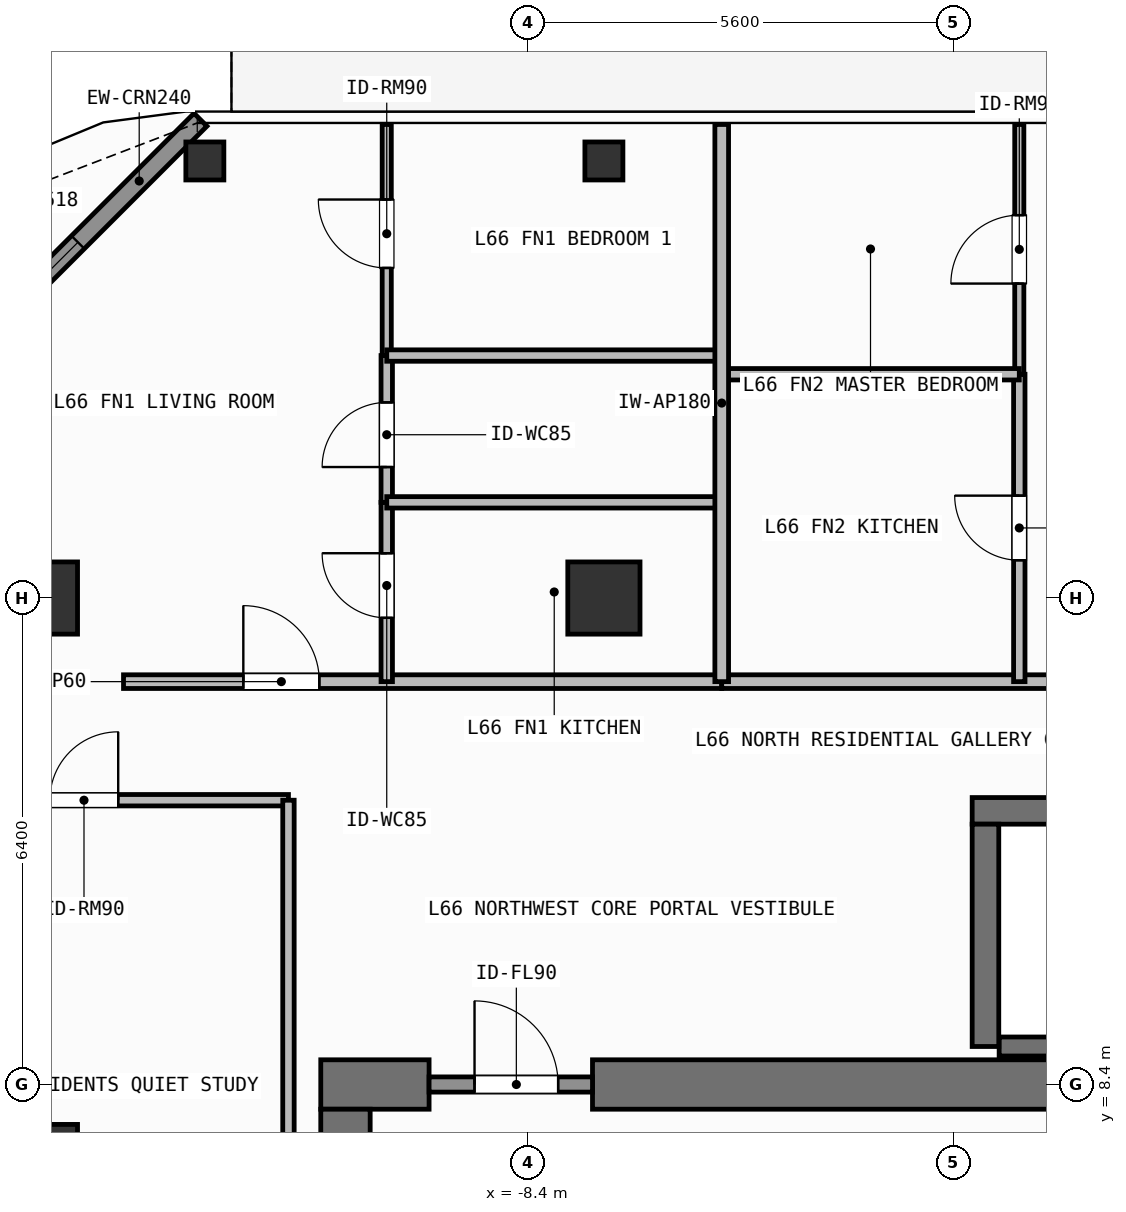
"""IFC4 building model, lengths in metres.
Left out: names, types, materials, properties, quantities, classifications, styles, units other than length and angle.
Written with IfcOpenShell. Run it as: python <this file> out.ifc"""

import sys

from ifc_helpers import new_model, si_unit, direction, frame, frame_2d, origin, origin_2d, place, context, subcontext, project, spatial, rectangle, hollow_rectangle, extrude, element, fill, save


model = new_model("IFC4")
c1 = context("Model", 3, precision=1e-05, world=origin(), true_north=direction((0.0, 1.0)))
c2 = subcontext(c1, "Body", "Model", "MODEL_VIEW")
j1 = project(units=[si_unit("LENGTHUNIT", "METRE"), si_unit("PLANEANGLEUNIT", "RADIAN")], contexts=[c1])
p1 = place(None, origin())
s1 = spatial("IfcSite", under=j1, at=p1, CompositionType="ELEMENT")
p2 = place(p1, origin())
s2 = spatial("IfcBuilding", under=s1, at=p2, CompositionType="ELEMENT")
p3 = place(p2, frame((0.0, 0.0, 270.3)))
s3 = spatial("IfcBuildingStorey", under=s2, at=p3, CompositionType="ELEMENT", Elevation=270.3)
p4 = place(p3, frame((-11.125, 8.4, 0.0), z_axis=(0.0, 0.0, 1.0), x_axis=(1.0, 0.0, 0.0)))
e1 = element("IfcWall", 1, at=p4, inside=s3, PredefinedType="SHEAR", context=c2, shape_type="SweptSolid", body=[
    extrude(rectangle(XDim=1.425, YDim=0.65, at=frame_2d((0.712, 0.0))), origin(), (0.0, 0.0, 1.0), 3.9),
])
p5 = place(p3, frame((-7.55, 8.4, 0.0), z_axis=(0.0, 0.0, 1.0), x_axis=(1.0, 0.0, 0.0)))
e2 = element("IfcWall", 2, at=p5, inside=s3, PredefinedType="SHEAR", context=c2, shape_type="SweptSolid", body=[
    extrude(rectangle(XDim=16.275, YDim=0.65, at=frame_2d((8.138, 0.0))), origin(), (0.0, 0.0, 1.0), 3.9),
])
p6 = place(p3, frame((-10.8, -8.075, 0.0), z_axis=(0.0, 0.0, 1.0), x_axis=(0.0, 1.0, 0.0)))
e3 = element("IfcWall", 3, at=p6, inside=s3, PredefinedType="SHEAR", context=c2, shape_type="SweptSolid", body=[
    extrude(rectangle(XDim=16.15, YDim=0.65, at=frame_2d((8.075, 0.0))), origin(), (0.0, 0.0, 1.0), 3.9),
])
p7 = place(p3, frame((-2.555, 12.0, 0.0), z_axis=(0.0, 0.0, 1.0), x_axis=(1.0, 0.0, 0.0)))
e4 = element("IfcWall", 4, at=p7, inside=s3, PredefinedType="SHEAR", context=c2, shape_type="SweptSolid", body=[
    extrude(rectangle(XDim=7.31, YDim=0.35, at=frame_2d((3.655, 0.0))), origin(), (0.0, 0.0, 1.0), 3.9),
])
p8 = place(p3, frame((-2.2, 8.9, 0.0), z_axis=(0.0, 0.0, 1.0), x_axis=(1.0, 0.0, 0.0)))
e5 = element("IfcWall", 5, at=p8, inside=s3, PredefinedType="SHEAR", context=c2, shape_type="SweptSolid", body=[
    extrude(rectangle(XDim=6.6, YDim=0.25, at=frame_2d((3.3, 0.0))), origin(), (0.0, 0.0, 1.0), 3.9),
])
p9 = place(p3, frame((-2.38, 8.9, 0.0), z_axis=(0.0, 0.0, 1.0), x_axis=(0.0, 1.0, 0.0)))
e6 = element("IfcWall", 6, at=p9, inside=s3, PredefinedType="SHEAR", context=c2, shape_type="SweptSolid", body=[
    extrude(rectangle(XDim=2.925, YDim=0.35, at=frame_2d((1.462, 0.0))), origin(), (0.0, 0.0, 1.0), 3.9),
])
for number, where, z_axis, x_axis in (
    (7, (-14.8, 14.8, 0.0), (0.0, 0.0, 1.0), (1.0, 0.0, 0.0)),
    (8, (-7.4, 14.8, 0.0), (0.0, 0.0, 1.0), (1.0, 0.0, 0.0)),
    (9, (-14.8, 7.4, 0.0), (0.0, 0.0, 1.0), (1.0, 0.0, 0.0)),
):
    element("IfcColumn", number, at=place(p3, frame(where, z_axis=z_axis, x_axis=x_axis)), inside=s3, PredefinedType="COLUMN", context=c2, shape_type="SweptSolid", body=[
        extrude(rectangle(XDim=0.95, YDim=0.95, at=origin_2d()), origin(), (0.0, 0.0, 1.0), 3.9),
    ])
for number, where, z_axis, x_axis in (
    (10, (-12.65, 20.55, 0.0), (0.0, 0.0, 1.0), (1.0, 0.0, 0.0)),
    (11, (-7.4, 20.55, 0.0), (0.0, 0.0, 1.0), (1.0, 0.0, 0.0)),
):
    element("IfcColumn", number, at=place(p3, frame(where, z_axis=z_axis, x_axis=x_axis)), inside=s3, PredefinedType="COLUMN", context=c2, shape_type="SweptSolid", body=[
        extrude(hollow_rectangle(XDim=0.5, YDim=0.5, WallThickness=0.025, at=origin_2d()), origin(), (0.0, 0.0, 1.0), 3.9),
    ])
p10 = place(p3, frame((-16.992, 16.808, 0.0), z_axis=(0.0, 0.0, 1.0), x_axis=(0.707126925818, 0.707086635981, 0.0)))
e12 = element("IfcWall", 12, at=p10, inside=s3, PredefinedType="SOLIDWALL", context=c2, shape_type="SweptSolid", body=[
    extrude(rectangle(XDim=6.06, YDim=0.24, at=frame_2d((3.03, 0.0))), origin(), (0.0, 0.0, 1.0), 3.68),
])
p11 = place(p10, frame((2.28, 0.0, 0.8)))
e13 = element("IfcOpeningElement", 13, at=p11, cuts=e12, PredefinedType="OPENING", context=c2, shape_type="SweptSolid", body=[
    extrude(rectangle(XDim=1.5, YDim=1.85, at=frame_2d((0.75, 0.925))), frame((0.0, 0.13, 0.0), z_axis=(0.0, -1.0, 0.0), x_axis=(1.0, 0.0, 0.0)), (0.0, 0.0, 1.0), 0.26),
])
p12 = place(p3, frame((-9.7, 8.4, 0.0), z_axis=(0.0, 0.0, 1.0), x_axis=(1.0, 0.0, 0.0)))
e14 = element("IfcWall", 14, at=p12, inside=s3, PredefinedType="SOLIDWALL", context=c2, shape_type="SweptSolid", body=[
    extrude(rectangle(XDim=2.15, YDim=0.2, at=frame_2d((1.075, 0.0))), origin(), (0.0, 0.0, 1.0), 2.92),
])
p13 = place(p12, frame((0.598, 0.0, 0.0)))
e15 = element("IfcOpeningElement", 15, at=p13, cuts=e14, PredefinedType="OPENING", context=c2, shape_type="SweptSolid", body=[
    extrude(rectangle(XDim=1.1, YDim=2.15, at=frame_2d((0.55, 1.075))), frame((0.0, 0.11, 0.0), z_axis=(0.0, -1.0, 0.0), x_axis=(1.0, 0.0, 0.0)), (0.0, 0.0, 1.0), 0.22),
])
p14 = place(p3, frame((-13.72, 13.7, 0.0), z_axis=(0.0, 0.0, 1.0), x_axis=(1.0, 0.0, 0.0)))
e16 = element("IfcWall", 16, at=p14, inside=s3, PredefinedType="PARTITIONING", context=c2, shape_type="SweptSolid", body=[
    extrude(rectangle(XDim=7.87, YDim=0.18, at=frame_2d((3.935, 0.0))), origin(), (0.0, 0.0, 1.0), 3.68),
])
p15 = place(p14, frame((1.576, 0.0, 0.0)))
e17 = element("IfcOpeningElement", 17, at=p15, cuts=e16, PredefinedType="OPENING", context=c2, shape_type="SweptSolid", body=[
    extrude(rectangle(XDim=1.0, YDim=2.2, at=frame_2d((0.5, 1.1))), frame((0.0, 0.1, 0.0), z_axis=(0.0, -1.0, 0.0), x_axis=(1.0, 0.0, 0.0)), (0.0, 0.0, 1.0), 0.2),
])
p16 = place(p3, frame((-10.257, 13.7, 0.0), z_axis=(0.0, 0.0, 1.0), x_axis=(0.0, 1.0, 0.0)))
e18 = element("IfcWall", 18, at=p16, inside=s3, PredefinedType="PARTITIONING", context=c2, shape_type="SweptSolid", body=[
    extrude(rectangle(XDim=2.359, YDim=0.15, at=frame_2d((1.18, 0.0))), origin(), (0.0, 0.0, 1.0), 3.68),
])
p17 = place(p16, frame((0.839, 0.0, 0.0)))
e19 = element("IfcOpeningElement", 19, at=p17, cuts=e18, PredefinedType="OPENING", context=c2, shape_type="SweptSolid", body=[
    extrude(rectangle(XDim=0.85, YDim=2.1, at=frame_2d((0.425, 1.05))), frame((0.0, 0.085, 0.0), z_axis=(0.0, -1.0, 0.0), x_axis=(1.0, 0.0, 0.0)), (0.0, 0.0, 1.0), 0.17),
])
p18 = place(p3, frame((-10.257, 16.059, 0.0), z_axis=(0.0, 0.0, 1.0), x_axis=(0.0, 1.0, 0.0)))
e20 = element("IfcWall", 20, at=p18, inside=s3, PredefinedType="PARTITIONING", context=c2, shape_type="SweptSolid", body=[
    extrude(rectangle(XDim=1.931, YDim=0.15, at=frame_2d((0.965, 0.0))), origin(), (0.0, 0.0, 1.0), 3.68),
])
p19 = place(p18, frame((0.464, 0.0, 0.0)))
e21 = element("IfcOpeningElement", 21, at=p19, cuts=e20, PredefinedType="OPENING", context=c2, shape_type="SweptSolid", body=[
    extrude(rectangle(XDim=0.85, YDim=2.1, at=frame_2d((0.425, 1.05))), frame((0.0, 0.085, 0.0), z_axis=(0.0, -1.0, 0.0), x_axis=(1.0, 0.0, 0.0)), (0.0, 0.0, 1.0), 0.17),
])
p20 = place(p3, frame((-10.257, 17.99, 0.0), z_axis=(0.0, 0.0, 1.0), x_axis=(0.0, 1.0, 0.0)))
e22 = element("IfcWall", 22, at=p20, inside=s3, PredefinedType="PARTITIONING", context=c2, shape_type="SweptSolid", body=[
    extrude(rectangle(XDim=3.04, YDim=0.12, at=frame_2d((1.52, 0.0))), origin(), (0.0, 0.0, 1.0), 3.68),
])
p21 = place(p20, frame((1.153, 0.0, 0.0)))
e23 = element("IfcOpeningElement", 23, at=p21, cuts=e22, PredefinedType="OPENING", context=c2, shape_type="SweptSolid", body=[
    extrude(rectangle(XDim=0.9, YDim=2.1, at=frame_2d((0.45, 1.05))), frame((0.0, 0.07, 0.0), z_axis=(0.0, -1.0, 0.0), x_axis=(1.0, 0.0, 0.0)), (0.0, 0.0, 1.0), 0.14),
])
p22 = place(p3, frame((-5.85, 13.7, 0.0), z_axis=(0.0, 0.0, 1.0), x_axis=(1.0, 0.0, 0.0)))
e24 = element("IfcWall", 24, at=p22, inside=s3, PredefinedType="PARTITIONING", context=c2, shape_type="SweptSolid", body=[
    extrude(rectangle(XDim=17.368, YDim=0.18, at=frame_2d((8.684, 0.0))), origin(), (0.0, 0.0, 1.0), 3.68),
])
p23 = place(p22, frame((7.114, 0.0, 0.0)))
e25 = element("IfcOpeningElement", 25, at=p23, cuts=e24, PredefinedType="OPENING", context=c2, shape_type="SweptSolid", body=[
    extrude(rectangle(XDim=1.0, YDim=2.2, at=frame_2d((0.5, 1.1))), frame((0.0, 0.1, 0.0), z_axis=(0.0, -1.0, 0.0), x_axis=(1.0, 0.0, 0.0)), (0.0, 0.0, 1.0), 0.2),
])
p24 = place(p3, frame((-1.935, 13.7, 0.0), z_axis=(0.0, 0.0, 1.0), x_axis=(0.0, 1.0, 0.0)))
e26 = element("IfcWall", 26, at=p24, inside=s3, PredefinedType="PARTITIONING", context=c2, shape_type="SweptSolid", body=[
    extrude(rectangle(XDim=4.044, YDim=0.15, at=frame_2d((2.022, 0.0))), origin(), (0.0, 0.0, 1.0), 3.68),
])
p25 = place(p24, frame((1.597, 0.0, 0.0)))
e27 = element("IfcOpeningElement", 27, at=p25, cuts=e26, PredefinedType="OPENING", context=c2, shape_type="SweptSolid", body=[
    extrude(rectangle(XDim=0.85, YDim=2.1, at=frame_2d((0.425, 1.05))), frame((0.0, 0.085, 0.0), z_axis=(0.0, -1.0, 0.0), x_axis=(1.0, 0.0, 0.0)), (0.0, 0.0, 1.0), 0.17),
])
p26 = place(p3, frame((-1.935, 17.744, 0.0), z_axis=(0.0, 0.0, 1.0), x_axis=(0.0, 1.0, 0.0)))
e28 = element("IfcWall", 28, at=p26, inside=s3, PredefinedType="PARTITIONING", context=c2, shape_type="SweptSolid", body=[
    extrude(rectangle(XDim=3.286, YDim=0.12, at=frame_2d((1.643, 0.0))), origin(), (0.0, 0.0, 1.0), 3.68),
])
p27 = place(p26, frame((1.193, 0.0, 0.0)))
e29 = element("IfcOpeningElement", 29, at=p27, cuts=e28, PredefinedType="OPENING", context=c2, shape_type="SweptSolid", body=[
    extrude(rectangle(XDim=0.9, YDim=2.1, at=frame_2d((0.45, 1.05))), frame((0.0, 0.07, 0.0), z_axis=(0.0, -1.0, 0.0), x_axis=(1.0, 0.0, 0.0)), (0.0, 0.0, 1.0), 0.14),
])
p28 = place(p3, frame((-16.93, 12.14, 0.0), z_axis=(0.0, 0.0, 1.0), x_axis=(1.0, 0.0, 0.0)))
e30 = element("IfcWall", 30, at=p28, inside=s3, PredefinedType="PARTITIONING", context=c2, shape_type="SweptSolid", body=[
    extrude(rectangle(XDim=5.38, YDim=0.15, at=frame_2d((2.69, 0.0))), origin(), (0.0, 0.0, 1.0), 3.68),
])
p29 = place(p28, frame((2.24, 0.0, 0.0)))
e31 = element("IfcOpeningElement", 31, at=p29, cuts=e30, PredefinedType="OPENING", context=c2, shape_type="SweptSolid", body=[
    extrude(rectangle(XDim=0.9, YDim=2.1, at=frame_2d((0.45, 1.05))), frame((0.0, 0.085, 0.0), z_axis=(0.0, -1.0, 0.0), x_axis=(1.0, 0.0, 0.0)), (0.0, 0.0, 1.0), 0.17),
])
for number, where, z_axis, x_axis in (
    (32, (-10.257, 16.059, 0.0), (0.0, 0.0, 1.0), (1.0, 0.0, 0.0)),
    (33, (-10.257, 17.99, 0.0), (0.0, 0.0, 1.0), (1.0, 0.0, 0.0)),
):
    element("IfcWall", number, at=place(p3, frame(where, z_axis=z_axis, x_axis=x_axis)), inside=s3, PredefinedType="PARTITIONING", context=c2, shape_type="SweptSolid", body=[
        extrude(rectangle(XDim=4.407, YDim=0.15, at=frame_2d((2.204, 0.0))), origin(), (0.0, 0.0, 1.0), 3.68),
    ])
p30 = place(p3, frame((-5.85, 17.744, 0.0), z_axis=(0.0, 0.0, 1.0), x_axis=(1.0, 0.0, 0.0)))
e34 = element("IfcWall", 34, at=p30, inside=s3, PredefinedType="PARTITIONING", context=c2, shape_type="SweptSolid", body=[
    extrude(rectangle(XDim=3.915, YDim=0.15, at=frame_2d((1.958, 0.0))), origin(), (0.0, 0.0, 1.0), 3.68),
])
p31 = place(p3, frame((-5.85, 13.7, 0.0), z_axis=(0.0, 0.0, 1.0), x_axis=(0.0, 1.0, 0.0)))
e35 = element("IfcWall", 35, at=p31, inside=s3, PredefinedType="PARTITIONING", context=c2, shape_type="SweptSolid", body=[
    extrude(rectangle(XDim=7.33, YDim=0.18, at=frame_2d((3.665, 0.0))), origin(), (0.0, 0.0, 1.0), 3.68),
])
p32 = place(p3, frame((-11.55, 4.1, 0.0), z_axis=(0.0, 0.0, 1.0), x_axis=(0.0, 1.0, 0.0)))
e36 = element("IfcWall", 36, at=p32, inside=s3, PredefinedType="PARTITIONING", context=c2, shape_type="SweptSolid", body=[
    extrude(rectangle(XDim=8.04, YDim=0.15, at=frame_2d((4.02, 0.0))), origin(), (0.0, 0.0, 1.0), 3.68),
])
p33 = place(p11, origin())
e37 = element("IfcWindow", 37, at=p33, inside=s3, PartitioningType="SINGLE_PANEL", PredefinedType="WINDOW", context=c2, shape_type="SweptSolid", body=[
    extrude(rectangle(XDim=1.5, YDim=1.85, at=frame_2d((0.75, 0.925))), frame((0.0, 0.03, 0.0), z_axis=(0.0, -1.0, 0.0), x_axis=(1.0, 0.0, 0.0)), (0.0, 0.0, 1.0), 0.06),
])
fill(e13, e37)
p34 = place(p13, origin())
e38 = element("IfcDoor", 38, at=p34, inside=s3, OperationType="SINGLE_SWING_LEFT", PredefinedType="DOOR", context=c2, shape_type="SweptSolid", body=[
    extrude(rectangle(XDim=1.1, YDim=2.15, at=frame_2d((0.55, 1.075))), frame((0.0, 0.025, 0.0), z_axis=(0.0, -1.0, 0.0), x_axis=(1.0, 0.0, 0.0)), (0.0, 0.0, 1.0), 0.05),
])
fill(e15, e38)
p35 = place(p15, origin())
e39 = element("IfcDoor", 39, at=p35, inside=s3, OperationType="SINGLE_SWING_LEFT", PredefinedType="DOOR", context=c2, shape_type="SweptSolid", body=[
    extrude(rectangle(XDim=1.0, YDim=2.2, at=frame_2d((0.5, 1.1))), frame((0.0, 0.025, 0.0), z_axis=(0.0, -1.0, 0.0), x_axis=(1.0, 0.0, 0.0)), (0.0, 0.0, 1.0), 0.05),
])
fill(e17, e39)
p36 = place(p17, origin())
e40 = element("IfcDoor", 40, at=p36, inside=s3, OperationType="SINGLE_SWING_RIGHT", PredefinedType="DOOR", context=c2, shape_type="SweptSolid", body=[
    extrude(rectangle(XDim=0.85, YDim=2.1, at=frame_2d((0.425, 1.05))), frame((0.0, 0.025, 0.0), z_axis=(0.0, -1.0, 0.0), x_axis=(1.0, 0.0, 0.0)), (0.0, 0.0, 1.0), 0.05),
])
fill(e19, e40)
p37 = place(p19, origin())
e41 = element("IfcDoor", 41, at=p37, inside=s3, OperationType="SINGLE_SWING_LEFT", PredefinedType="DOOR", context=c2, shape_type="SweptSolid", body=[
    extrude(rectangle(XDim=0.85, YDim=2.1, at=frame_2d((0.425, 1.05))), frame((0.0, 0.025, 0.0), z_axis=(0.0, -1.0, 0.0), x_axis=(1.0, 0.0, 0.0)), (0.0, 0.0, 1.0), 0.05),
])
fill(e21, e41)
p38 = place(p21, origin())
e42 = element("IfcDoor", 42, at=p38, inside=s3, OperationType="SINGLE_SWING_RIGHT", PredefinedType="DOOR", context=c2, shape_type="SweptSolid", body=[
    extrude(rectangle(XDim=0.9, YDim=2.1, at=frame_2d((0.45, 1.05))), frame((0.0, 0.025, 0.0), z_axis=(0.0, -1.0, 0.0), x_axis=(1.0, 0.0, 0.0)), (0.0, 0.0, 1.0), 0.05),
])
fill(e23, e42)
p39 = place(p25, origin())
e43 = element("IfcDoor", 43, at=p39, inside=s3, OperationType="SINGLE_SWING_RIGHT", PredefinedType="DOOR", context=c2, shape_type="SweptSolid", body=[
    extrude(rectangle(XDim=0.85, YDim=2.1, at=frame_2d((0.425, 1.05))), frame((0.0, 0.025, 0.0), z_axis=(0.0, -1.0, 0.0), x_axis=(1.0, 0.0, 0.0)), (0.0, 0.0, 1.0), 0.05),
])
fill(e27, e43)
p40 = place(p27, origin())
e44 = element("IfcDoor", 44, at=p40, inside=s3, OperationType="SINGLE_SWING_LEFT", PredefinedType="DOOR", context=c2, shape_type="SweptSolid", body=[
    extrude(rectangle(XDim=0.9, YDim=2.1, at=frame_2d((0.45, 1.05))), frame((0.0, 0.025, 0.0), z_axis=(0.0, -1.0, 0.0), x_axis=(1.0, 0.0, 0.0)), (0.0, 0.0, 1.0), 0.05),
])
fill(e29, e44)
p41 = place(p29, origin())
e45 = element("IfcDoor", 45, at=p41, inside=s3, OperationType="SINGLE_SWING_RIGHT", PredefinedType="DOOR", context=c2, shape_type="SweptSolid", body=[
    extrude(rectangle(XDim=0.9, YDim=2.1, at=frame_2d((0.45, 1.05))), frame((0.0, 0.025, 0.0), z_axis=(0.0, -1.0, 0.0), x_axis=(1.0, 0.0, 0.0)), (0.0, 0.0, 1.0), 0.05),
])
fill(e31, e45)
save(model, sys.argv[1])
